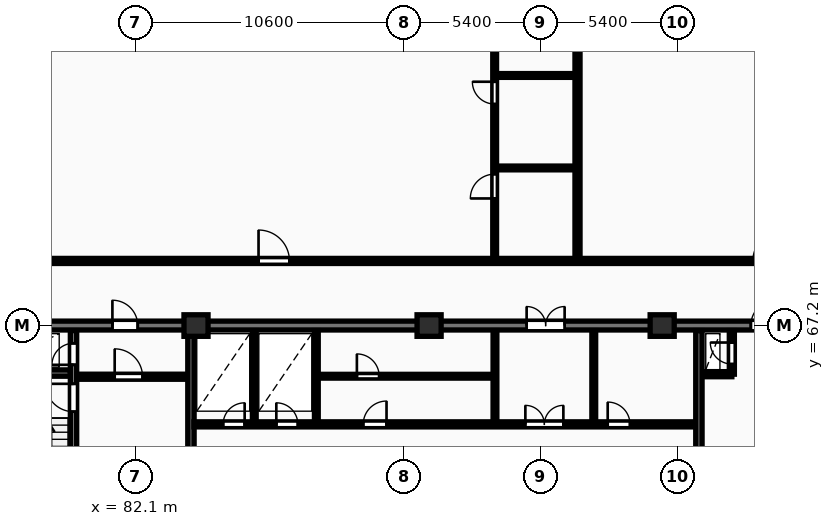
"""IFC4 building model, lengths in metres.
Left out: names, types, materials, properties, quantities, classifications, styles, units other than length and angle.
Written with IfcOpenShell. Run it as: python <this file> out.ifc"""

import sys

from ifc_helpers import new_model, si_unit, direction, frame, frame_2d, origin, origin_2d, place, context, subcontext, project, spatial, rectangle, extrude, element, fill, save


model = new_model("IFC4")
c1 = context("Model", 3, precision=1e-05, world=origin(), true_north=direction((0.0, 1.0)))
c2 = subcontext(c1, "Body", "Model", "MODEL_VIEW")
j1 = project(units=[si_unit("LENGTHUNIT", "METRE"), si_unit("PLANEANGLEUNIT", "RADIAN")], contexts=[c1])
p1 = place(None, origin())
s1 = spatial("IfcSite", under=j1, at=p1, CompositionType="ELEMENT")
p2 = place(p1, origin())
s2 = spatial("IfcBuilding", under=s1, at=p2, CompositionType="ELEMENT")
p3 = place(p2, frame((0.0, 0.0, 93.8)))
s3 = spatial("IfcBuildingStorey", under=s2, at=p3, CompositionType="ELEMENT", Elevation=93.8)
for number, where, z_axis, x_axis in (
    (1, (84.5, 67.2, 0.0), (0.0, 0.0, 1.0), (1.0, 0.0, 0.0)),
    (2, (93.7, 67.2, 0.0), (0.0, 0.0, 1.0), (1.0, 0.0, 0.0)),
    (3, (102.9, 67.2, 0.0), (0.0, 0.0, 1.0), (1.0, 0.0, 0.0)),
):
    element("IfcColumn", number, at=place(p3, frame(where, z_axis=z_axis, x_axis=x_axis)), inside=s3, PredefinedType="COLUMN", context=c2, shape_type="SweptSolid", body=[
        extrude(rectangle(XDim=0.95, YDim=0.85, at=origin_2d()), origin(), (0.0, 0.0, 1.0), 3.25),
    ])
p4 = place(p3, frame((75.95, 67.2, 0.0), z_axis=(0.0, 0.0, 1.0), x_axis=(1.0, 0.0, 0.0)))
e4 = element("IfcWall", 4, at=p4, inside=s3, PredefinedType="SHEAR", context=c2, shape_type="SweptSolid", body=[
    extrude(rectangle(XDim=36.3, YDim=0.35, at=frame_2d((18.15, 0.0))), origin(), (0.0, 0.0, 1.0), 3.25),
])
p5 = place(p4, frame((5.25, 0.0, 0.0)))
e5 = element("IfcOpeningElement", 5, at=p5, cuts=e4, PredefinedType="OPENING", context=c2, shape_type="SweptSolid", body=[
    extrude(rectangle(XDim=1.0, YDim=2.15, at=frame_2d((0.5, 1.075))), frame((0.0, 0.185, 0.0), z_axis=(0.0, -1.0, 0.0), x_axis=(1.0, 0.0, 0.0)), (0.0, 0.0, 1.0), 0.37),
])
p6 = place(p4, frame((21.6, 0.0, 0.0)))
e6 = element("IfcOpeningElement", 6, at=p6, cuts=e4, PredefinedType="OPENING", context=c2, shape_type="SweptSolid", body=[
    extrude(rectangle(XDim=1.5, YDim=2.2, at=frame_2d((0.75, 1.1))), frame((0.0, 0.185, 0.0), z_axis=(0.0, -1.0, 0.0), x_axis=(1.0, 0.0, 0.0)), (0.0, 0.0, 1.0), 0.37),
])
p7 = place(p4, frame((30.45, 0.0, 0.0)))
e7 = element("IfcOpeningElement", 7, at=p7, cuts=e4, PredefinedType="OPENING", context=c2, shape_type="SweptSolid", body=[
    extrude(rectangle(XDim=1.0, YDim=2.15, at=frame_2d((0.5, 1.075))), frame((0.0, 0.185, 0.0), z_axis=(0.0, -1.0, 0.0), x_axis=(1.0, 0.0, 0.0)), (0.0, 0.0, 1.0), 0.37),
])
p8 = place(p3, frame((79.665, 55.4, 0.0), z_axis=(0.0, 0.0, 1.0), x_axis=(0.0, 1.0, 0.0)))
e8 = element("IfcWall", 8, at=p8, inside=s3, PredefinedType="SHEAR", context=c2, shape_type="SweptSolid", body=[
    extrude(rectangle(XDim=11.6, YDim=0.25, at=frame_2d((5.8, 0.0))), origin(), (0.0, 0.0, 1.0), 3.25),
])
p9 = place(p8, frame((0.55, 0.0, 0.0)))
e9 = element("IfcOpeningElement", 9, at=p9, cuts=e8, PredefinedType="OPENING", context=c2, shape_type="SweptSolid", body=[
    extrude(rectangle(XDim=0.85, YDim=2.05, at=frame_2d((0.425, 1.025))), frame((0.0, 0.135, 0.0), z_axis=(0.0, -1.0, 0.0), x_axis=(1.0, 0.0, 0.0)), (0.0, 0.0, 1.0), 0.27),
])
p10 = place(p8, frame((8.4, 0.0, 0.0)))
e10 = element("IfcOpeningElement", 10, at=p10, cuts=e8, PredefinedType="OPENING", context=c2, shape_type="SweptSolid", body=[
    extrude(rectangle(XDim=1.1, YDim=2.1, at=frame_2d((0.55, 1.05))), frame((0.0, 0.135, 0.0), z_axis=(0.0, -1.0, 0.0), x_axis=(1.0, 0.0, 0.0)), (0.0, 0.0, 1.0), 0.27),
])
p11 = place(p8, frame((10.25, 0.0, 0.0)))
e11 = element("IfcOpeningElement", 11, at=p11, cuts=e8, PredefinedType="OPENING", context=c2, shape_type="SweptSolid", body=[
    extrude(rectangle(XDim=0.85, YDim=2.05, at=frame_2d((0.425, 1.025))), frame((0.0, 0.135, 0.0), z_axis=(0.0, -1.0, 0.0), x_axis=(1.0, 0.0, 0.0)), (0.0, 0.0, 1.0), 0.27),
])
p12 = place(p3, frame((76.3, 65.325, 0.0), z_axis=(0.0, 0.0, 1.0), x_axis=(1.0, 0.0, 0.0)))
e12 = element("IfcWall", 12, at=p12, inside=s3, PredefinedType="SHEAR", context=c2, shape_type="SweptSolid", body=[
    extrude(rectangle(XDim=3.24, YDim=0.25, at=frame_2d((1.62, 0.0))), origin(), (0.0, 0.0, 1.0), 3.25),
])
p13 = place(p3, frame((79.79, 65.18, 0.0), z_axis=(0.0, 0.0, 1.0), x_axis=(1.0, 0.0, 0.0)))
e13 = element("IfcWall", 13, at=p13, inside=s3, PredefinedType="PARTITIONING", context=c2, shape_type="SweptSolid", body=[
    extrude(rectangle(XDim=4.39, YDim=0.2, at=frame_2d((2.195, 0.0))), origin(), (0.0, 0.0, 1.0), 2.97),
])
p14 = place(p13, frame((1.5, 0.0, 0.0)))
e14 = element("IfcOpeningElement", 14, at=p14, cuts=e13, PredefinedType="OPENING", context=c2, shape_type="SweptSolid", body=[
    extrude(rectangle(XDim=1.1, YDim=2.1, at=frame_2d((0.55, 1.05))), frame((0.0, 0.11, 0.0), z_axis=(0.0, -1.0, 0.0), x_axis=(1.0, 0.0, 0.0)), (0.0, 0.0, 1.0), 0.22),
])
p15 = place(p3, frame((84.3, 55.4, 0.0), z_axis=(0.0, 0.0, 1.0), x_axis=(0.0, 1.0, 0.0)))
e15 = element("IfcWall", 15, at=p15, inside=s3, PredefinedType="SHEAR", context=c2, shape_type="SweptSolid", body=[
    extrude(rectangle(XDim=11.6, YDim=0.25, at=frame_2d((5.8, 0.0))), origin(), (0.0, 0.0, 1.0), 3.25),
])
p16 = place(p15, frame((5.2, 0.0, 0.0)))
e16 = element("IfcOpeningElement", 16, at=p16, cuts=e15, PredefinedType="OPENING", context=c2, shape_type="SweptSolid", body=[
    extrude(rectangle(XDim=1.1, YDim=2.1, at=frame_2d((0.55, 1.05))), frame((0.0, 0.135, 0.0), z_axis=(0.0, -1.0, 0.0), x_axis=(1.0, 0.0, 0.0)), (0.0, 0.0, 1.0), 0.27),
])
for number, where, z_axis, x_axis in (
    (17, (86.8, 63.4, 0.0), (0.0, 0.0, 1.0), (0.0, 1.0, 0.0)),
    (18, (89.25, 63.4, 0.0), (0.0, 0.0, 1.0), (0.0, 1.0, 0.0)),
):
    element("IfcWall", number, at=place(p3, frame(where, z_axis=z_axis, x_axis=x_axis)), inside=s3, PredefinedType="PARTITIONING", context=c2, shape_type="SweptSolid", body=[
        extrude(rectangle(XDim=3.6, YDim=0.15, at=frame_2d((1.8, 0.0))), origin(), (0.0, 0.0, 1.0), 2.97),
    ])
p17 = place(p3, frame((89.25, 65.2, 0.0), z_axis=(0.0, 0.0, 1.0), x_axis=(1.0, 0.0, 0.0)))
e19 = element("IfcWall", 19, at=p17, inside=s3, PredefinedType="PARTITIONING", context=c2, shape_type="SweptSolid", body=[
    extrude(rectangle(XDim=7.05, YDim=0.15, at=frame_2d((3.525, 0.0))), origin(), (0.0, 0.0, 1.0), 2.97),
])
p18 = place(p17, frame((1.6, 0.0, 0.0)))
e20 = element("IfcOpeningElement", 20, at=p18, cuts=e19, PredefinedType="OPENING", context=c2, shape_type="SweptSolid", body=[
    extrude(rectangle(XDim=0.88, YDim=2.06, at=frame_2d((0.44, 1.03))), frame((0.0, 0.085, 0.0), z_axis=(0.0, -1.0, 0.0), x_axis=(1.0, 0.0, 0.0)), (0.0, 0.0, 1.0), 0.17),
])
for number, where, z_axis, x_axis in (
    (21, (96.3, 63.4, 0.0), (0.0, 0.0, 1.0), (0.0, 1.0, 0.0)),
    (22, (100.2, 63.4, 0.0), (0.0, 0.0, 1.0), (0.0, 1.0, 0.0)),
):
    element("IfcWall", number, at=place(p3, frame(where, z_axis=z_axis, x_axis=x_axis)), inside=s3, PredefinedType="PARTITIONING", context=c2, shape_type="SweptSolid", body=[
        extrude(rectangle(XDim=3.6, YDim=0.15, at=frame_2d((1.8, 0.0))), origin(), (0.0, 0.0, 1.0), 2.97),
    ])
p19 = place(p3, frame((84.42, 63.3, 0.0), z_axis=(0.0, 0.0, 1.0), x_axis=(1.0, 0.0, 0.0)))
e23 = element("IfcWall", 23, at=p19, inside=s3, PredefinedType="PARTITIONING", context=c2, shape_type="SweptSolid", body=[
    extrude(rectangle(XDim=19.83, YDim=0.2, at=frame_2d((9.915, 0.0))), origin(), (0.0, 0.0, 1.0), 2.97),
])
p20 = place(p19, frame((1.15, 0.0, 0.0)))
e24 = element("IfcOpeningElement", 24, at=p20, cuts=e23, PredefinedType="OPENING", context=c2, shape_type="SweptSolid", body=[
    extrude(rectangle(XDim=0.85, YDim=2.05, at=frame_2d((0.425, 1.025))), frame((0.0, 0.11, 0.0), z_axis=(0.0, -1.0, 0.0), x_axis=(1.0, 0.0, 0.0)), (0.0, 0.0, 1.0), 0.22),
])
p21 = place(p19, frame((3.25, 0.0, 0.0)))
e25 = element("IfcOpeningElement", 25, at=p21, cuts=e23, PredefinedType="OPENING", context=c2, shape_type="SweptSolid", body=[
    extrude(rectangle(XDim=0.85, YDim=2.05, at=frame_2d((0.425, 1.025))), frame((0.0, 0.11, 0.0), z_axis=(0.0, -1.0, 0.0), x_axis=(1.0, 0.0, 0.0)), (0.0, 0.0, 1.0), 0.22),
])
p22 = place(p19, frame((13.08, 0.0, 0.0)))
e26 = element("IfcOpeningElement", 26, at=p22, cuts=e23, PredefinedType="OPENING", context=c2, shape_type="SweptSolid", body=[
    extrude(rectangle(XDim=1.5, YDim=2.2, at=frame_2d((0.75, 1.1))), frame((0.0, 0.11, 0.0), z_axis=(0.0, -1.0, 0.0), x_axis=(1.0, 0.0, 0.0)), (0.0, 0.0, 1.0), 0.22),
])
p23 = place(p19, frame((6.68, 0.0, 0.0)))
e27 = element("IfcOpeningElement", 27, at=p23, cuts=e23, PredefinedType="OPENING", context=c2, shape_type="SweptSolid", body=[
    extrude(rectangle(XDim=0.92, YDim=2.08, at=frame_2d((0.46, 1.04))), frame((0.0, 0.11, 0.0), z_axis=(0.0, -1.0, 0.0), x_axis=(1.0, 0.0, 0.0)), (0.0, 0.0, 1.0), 0.22),
])
p24 = place(p19, frame((16.33, 0.0, 0.0)))
e28 = element("IfcOpeningElement", 28, at=p24, cuts=e23, PredefinedType="OPENING", context=c2, shape_type="SweptSolid", body=[
    extrude(rectangle(XDim=0.88, YDim=2.06, at=frame_2d((0.44, 1.03))), frame((0.0, 0.11, 0.0), z_axis=(0.0, -1.0, 0.0), x_axis=(1.0, 0.0, 0.0)), (0.0, 0.0, 1.0), 0.22),
])
p25 = place(p3, frame((104.45, 65.28, 0.0), z_axis=(0.0, 0.0, 1.0), x_axis=(1.0, 0.0, 0.0)))
e29 = element("IfcWall", 29, at=p25, inside=s3, PredefinedType="PARTITIONING", context=c2, shape_type="SweptSolid", body=[
    extrude(rectangle(XDim=1.2, YDim=0.2, at=frame_2d((0.6, 0.0))), origin(), (0.0, 0.0, 1.0), 2.97),
])
p26 = place(p3, frame((105.65, 65.28, 0.0), z_axis=(0.0, 0.0, 1.0), x_axis=(0.0, 1.0, 0.0)))
e30 = element("IfcWall", 30, at=p26, inside=s3, PredefinedType="PARTITIONING", context=c2, shape_type="SweptSolid", body=[
    extrude(rectangle(XDim=1.72, YDim=0.2, at=frame_2d((0.86, 0.0))), origin(), (0.0, 0.0, 1.0), 2.97),
])
p27 = place(p26, frame((0.4, 0.0, 0.0)))
e31 = element("IfcOpeningElement", 31, at=p27, cuts=e30, PredefinedType="OPENING", context=c2, shape_type="SweptSolid", body=[
    extrude(rectangle(XDim=0.85, YDim=2.05, at=frame_2d((0.425, 1.025))), frame((0.0, 0.11, 0.0), z_axis=(0.0, -1.0, 0.0), x_axis=(1.0, 0.0, 0.0)), (0.0, 0.0, 1.0), 0.22),
])
p28 = place(p3, frame((104.35, 58.4, 0.0), z_axis=(0.0, 0.0, 1.0), x_axis=(0.0, 1.0, 0.0)))
e32 = element("IfcWall", 32, at=p28, inside=s3, PredefinedType="SHEAR", context=c2, shape_type="SweptSolid", body=[
    extrude(rectangle(XDim=8.6, YDim=0.25, at=frame_2d((4.3, 0.0))), origin(), (0.0, 0.0, 1.0), 3.25),
])
p29 = place(p28, frame((1.8, 0.0, 0.0)))
e33 = element("IfcOpeningElement", 33, at=p29, cuts=e32, PredefinedType="OPENING", context=c2, shape_type="SweptSolid", body=[
    extrude(rectangle(XDim=1.1, YDim=2.1, at=frame_2d((0.55, 1.05))), frame((0.0, 0.135, 0.0), z_axis=(0.0, -1.0, 0.0), x_axis=(1.0, 0.0, 0.0)), (0.0, 0.0, 1.0), 0.27),
])
p30 = place(p3, frame((99.558, 69.83, 0.0), z_axis=(0.0, 0.0, 1.0), x_axis=(0.0, 1.0, 0.0)))
e34 = element("IfcWall", 34, at=p30, inside=s3, PredefinedType="PARTITIONING", context=c2, shape_type="SweptSolid", body=[
    extrude(rectangle(XDim=26.07, YDim=0.2, at=frame_2d((13.035, 0.0))), origin(), (0.0, 0.0, 1.0), 2.97),
])
p31 = place(p3, frame((96.348, 73.42, 0.0), z_axis=(0.0, 0.0, 1.0), x_axis=(1.0, 0.0, 0.0)))
e35 = element("IfcWall", 35, at=p31, inside=s3, PredefinedType="PARTITIONING", context=c2, shape_type="SweptSolid", body=[
    extrude(rectangle(XDim=3.13, YDim=0.15, at=frame_2d((1.565, 0.0))), origin(), (0.0, 0.0, 1.0), 2.561),
])
p32 = place(p3, frame((96.348, 77.07, 0.0), z_axis=(0.0, 0.0, 1.0), x_axis=(1.0, 0.0, 0.0)))
e36 = element("IfcWall", 36, at=p32, inside=s3, PredefinedType="PARTITIONING", context=c2, shape_type="SweptSolid", body=[
    extrude(rectangle(XDim=3.13, YDim=0.15, at=frame_2d((1.565, 0.0))), origin(), (0.0, 0.0, 1.0), 2.97),
])
p33 = place(p3, frame((96.288, 69.81, 0.0), z_axis=(0.0, 0.0, 1.0), x_axis=(0.0, 1.0, 0.0)))
e37 = element("IfcWall", 37, at=p33, inside=s3, PredefinedType="PARTITIONING", context=c2, shape_type="SweptSolid", body=[
    extrude(rectangle(XDim=20.78, YDim=0.15, at=frame_2d((10.39, 0.0))), origin(), (0.0, 0.0, 1.0), 2.97),
])
p34 = place(p33, frame((2.406, 0.0, 0.0)))
e38 = element("IfcOpeningElement", 38, at=p34, cuts=e37, PredefinedType="OPENING", context=c2, shape_type="SweptSolid", body=[
    extrude(rectangle(XDim=0.96, YDim=2.1, at=frame_2d((0.48, 1.05))), frame((0.0, 0.085, 0.0), z_axis=(0.0, -1.0, 0.0), x_axis=(1.0, 0.0, 0.0)), (0.0, 0.0, 1.0), 0.17),
])
p35 = place(p33, frame((6.133, 0.0, 0.0)))
e39 = element("IfcOpeningElement", 39, at=p35, cuts=e37, PredefinedType="OPENING", context=c2, shape_type="SweptSolid", body=[
    extrude(rectangle(XDim=0.88, YDim=2.06, at=frame_2d((0.44, 1.03))), frame((0.0, 0.085, 0.0), z_axis=(0.0, -1.0, 0.0), x_axis=(1.0, 0.0, 0.0)), (0.0, 0.0, 1.0), 0.17),
])
p36 = place(p33, frame((11.615, 0.0, 0.0)))
e40 = element("IfcOpeningElement", 40, at=p36, cuts=e37, PredefinedType="OPENING", context=c2, shape_type="SweptSolid", body=[
    extrude(rectangle(XDim=0.84, YDim=2.04, at=frame_2d((0.42, 1.02))), frame((0.0, 0.085, 0.0), z_axis=(0.0, -1.0, 0.0), x_axis=(1.0, 0.0, 0.0)), (0.0, 0.0, 1.0), 0.17),
])
p37 = place(p3, frame((57.6, 69.75, 0.0), z_axis=(0.0, 0.0, 1.0), x_axis=(1.0, 0.0, 0.0)))
e41 = element("IfcWall", 41, at=p37, inside=s3, PredefinedType="PARTITIONING", context=c2, shape_type="SweptSolid", body=[
    extrude(rectangle(XDim=73.0, YDim=0.2, at=frame_2d((36.5, 0.0))), origin(), (0.0, 0.0, 1.0), 2.97),
])
p38 = place(p37, frame((7.372, 0.0, 0.0)))
e42 = element("IfcOpeningElement", 42, at=p38, cuts=e41, PredefinedType="OPENING", context=c2, shape_type="SweptSolid", body=[
    extrude(rectangle(XDim=1.22, YDim=2.18, at=frame_2d((0.61, 1.09))), frame((0.0, 0.11, 0.0), z_axis=(0.0, -1.0, 0.0), x_axis=(1.0, 0.0, 0.0)), (0.0, 0.0, 1.0), 0.22),
])
p39 = place(p37, frame((29.368, 0.0, 0.0)))
e43 = element("IfcOpeningElement", 43, at=p39, cuts=e41, PredefinedType="OPENING", context=c2, shape_type="SweptSolid", body=[
    extrude(rectangle(XDim=1.22, YDim=2.18, at=frame_2d((0.61, 1.09))), frame((0.0, 0.11, 0.0), z_axis=(0.0, -1.0, 0.0), x_axis=(1.0, 0.0, 0.0)), (0.0, 0.0, 1.0), 0.22),
])
p40 = place(p37, frame((48.88, 0.0, 0.0)))
e44 = element("IfcOpeningElement", 44, at=p40, cuts=e41, PredefinedType="OPENING", context=c2, shape_type="SweptSolid", body=[
    extrude(rectangle(XDim=1.22, YDim=2.18, at=frame_2d((0.61, 1.09))), frame((0.0, 0.11, 0.0), z_axis=(0.0, -1.0, 0.0), x_axis=(1.0, 0.0, 0.0)), (0.0, 0.0, 1.0), 0.22),
])
p41 = place(p37, frame((60.081, 0.0, 0.0)))
e45 = element("IfcOpeningElement", 45, at=p41, cuts=e41, PredefinedType="OPENING", context=c2, shape_type="SweptSolid", body=[
    extrude(rectangle(XDim=0.95, YDim=2.15, at=frame_2d((0.475, 1.075))), frame((0.0, 0.11, 0.0), z_axis=(0.0, -1.0, 0.0), x_axis=(1.0, 0.0, 0.0)), (0.0, 0.0, 1.0), 0.22),
])
p42 = place(p5, origin())
e46 = element("IfcDoor", 46, at=p42, inside=s3, OperationType="SINGLE_SWING_LEFT", PredefinedType="DOOR", context=c2, shape_type="SweptSolid", body=[
    extrude(rectangle(XDim=1.0, YDim=2.15, at=frame_2d((0.5, 1.075))), frame((0.0, 0.025, 0.0), z_axis=(0.0, -1.0, 0.0), x_axis=(1.0, 0.0, 0.0)), (0.0, 0.0, 1.0), 0.05),
])
fill(e5, e46)
p43 = place(p6, origin())
e47 = element("IfcDoor", 47, at=p43, inside=s3, OperationType="DOUBLE_DOOR_SINGLE_SWING", PredefinedType="DOOR", context=c2, shape_type="SweptSolid", body=[
    extrude(rectangle(XDim=1.5, YDim=2.2, at=frame_2d((0.75, 1.1))), frame((0.0, 0.025, 0.0), z_axis=(0.0, -1.0, 0.0), x_axis=(1.0, 0.0, 0.0)), (0.0, 0.0, 1.0), 0.05),
])
fill(e6, e47)
p44 = place(p7, origin())
e48 = element("IfcDoor", 48, at=p44, inside=s3, OperationType="SINGLE_SWING_RIGHT", PredefinedType="DOOR", context=c2, shape_type="SweptSolid", body=[
    extrude(rectangle(XDim=1.0, YDim=2.15, at=frame_2d((0.5, 1.075))), frame((0.0, 0.025, 0.0), z_axis=(0.0, -1.0, 0.0), x_axis=(1.0, 0.0, 0.0)), (0.0, 0.0, 1.0), 0.05),
])
fill(e7, e48)
p45 = place(p10, origin())
e49 = element("IfcDoor", 49, at=p45, inside=s3, OperationType="SINGLE_SWING_RIGHT", PredefinedType="DOOR", context=c2, shape_type="SweptSolid", body=[
    extrude(rectangle(XDim=1.1, YDim=2.1, at=frame_2d((0.55, 1.05))), frame((0.0, 0.025, 0.0), z_axis=(0.0, -1.0, 0.0), x_axis=(1.0, 0.0, 0.0)), (0.0, 0.0, 1.0), 0.05),
])
fill(e10, e49)
p46 = place(p11, origin())
e50 = element("IfcDoor", 50, at=p46, inside=s3, OperationType="SINGLE_SWING_LEFT", PredefinedType="DOOR", context=c2, shape_type="SweptSolid", body=[
    extrude(rectangle(XDim=0.85, YDim=2.05, at=frame_2d((0.425, 1.025))), frame((0.0, 0.025, 0.0), z_axis=(0.0, -1.0, 0.0), x_axis=(1.0, 0.0, 0.0)), (0.0, 0.0, 1.0), 0.05),
])
fill(e11, e50)
p47 = place(p14, origin())
e51 = element("IfcDoor", 51, at=p47, inside=s3, OperationType="SINGLE_SWING_LEFT", PredefinedType="DOOR", context=c2, shape_type="SweptSolid", body=[
    extrude(rectangle(XDim=1.1, YDim=2.1, at=frame_2d((0.55, 1.05))), frame((0.0, 0.025, 0.0), z_axis=(0.0, -1.0, 0.0), x_axis=(1.0, 0.0, 0.0)), (0.0, 0.0, 1.0), 0.05),
])
fill(e14, e51)
p48 = place(p18, origin())
e52 = element("IfcDoor", 52, at=p48, inside=s3, OperationType="SINGLE_SWING_LEFT", PredefinedType="DOOR", context=c2, shape_type="SweptSolid", body=[
    extrude(rectangle(XDim=0.88, YDim=2.06, at=frame_2d((0.44, 1.03))), frame((0.0, 0.025, 0.0), z_axis=(0.0, -1.0, 0.0), x_axis=(1.0, 0.0, 0.0)), (0.0, 0.0, 1.0), 0.05),
])
fill(e20, e52)
p49 = place(p20, origin())
e53 = element("IfcDoor", 53, at=p49, inside=s3, OperationType="SINGLE_SWING_RIGHT", PredefinedType="DOOR", context=c2, shape_type="SweptSolid", body=[
    extrude(rectangle(XDim=0.85, YDim=2.05, at=frame_2d((0.425, 1.025))), frame((0.0, 0.025, 0.0), z_axis=(0.0, -1.0, 0.0), x_axis=(1.0, 0.0, 0.0)), (0.0, 0.0, 1.0), 0.05),
])
fill(e24, e53)
p50 = place(p21, origin())
e54 = element("IfcDoor", 54, at=p50, inside=s3, OperationType="SINGLE_SWING_LEFT", PredefinedType="DOOR", context=c2, shape_type="SweptSolid", body=[
    extrude(rectangle(XDim=0.85, YDim=2.05, at=frame_2d((0.425, 1.025))), frame((0.0, 0.025, 0.0), z_axis=(0.0, -1.0, 0.0), x_axis=(1.0, 0.0, 0.0)), (0.0, 0.0, 1.0), 0.05),
])
fill(e25, e54)
p51 = place(p22, origin())
e55 = element("IfcDoor", 55, at=p51, inside=s3, OperationType="DOUBLE_DOOR_SINGLE_SWING", PredefinedType="DOOR", context=c2, shape_type="SweptSolid", body=[
    extrude(rectangle(XDim=1.5, YDim=2.2, at=frame_2d((0.75, 1.1))), frame((0.0, 0.025, 0.0), z_axis=(0.0, -1.0, 0.0), x_axis=(1.0, 0.0, 0.0)), (0.0, 0.0, 1.0), 0.05),
])
fill(e26, e55)
p52 = place(p23, origin())
e56 = element("IfcDoor", 56, at=p52, inside=s3, OperationType="SINGLE_SWING_RIGHT", PredefinedType="DOOR", context=c2, shape_type="SweptSolid", body=[
    extrude(rectangle(XDim=0.92, YDim=2.08, at=frame_2d((0.46, 1.04))), frame((0.0, 0.025, 0.0), z_axis=(0.0, -1.0, 0.0), x_axis=(1.0, 0.0, 0.0)), (0.0, 0.0, 1.0), 0.05),
])
fill(e27, e56)
p53 = place(p24, origin())
e57 = element("IfcDoor", 57, at=p53, inside=s3, OperationType="SINGLE_SWING_LEFT", PredefinedType="DOOR", context=c2, shape_type="SweptSolid", body=[
    extrude(rectangle(XDim=0.88, YDim=2.06, at=frame_2d((0.44, 1.03))), frame((0.0, 0.025, 0.0), z_axis=(0.0, -1.0, 0.0), x_axis=(1.0, 0.0, 0.0)), (0.0, 0.0, 1.0), 0.05),
])
fill(e28, e57)
p54 = place(p27, origin())
e58 = element("IfcDoor", 58, at=p54, inside=s3, OperationType="SINGLE_SWING_RIGHT", PredefinedType="DOOR", context=c2, shape_type="SweptSolid", body=[
    extrude(rectangle(XDim=0.85, YDim=2.05, at=frame_2d((0.425, 1.025))), frame((0.0, 0.025, 0.0), z_axis=(0.0, -1.0, 0.0), x_axis=(1.0, 0.0, 0.0)), (0.0, 0.0, 1.0), 0.05),
])
fill(e31, e58)
p55 = place(p34, origin())
e59 = element("IfcDoor", 59, at=p55, inside=s3, OperationType="SINGLE_SWING_LEFT", PredefinedType="DOOR", context=c2, shape_type="SweptSolid", body=[
    extrude(rectangle(XDim=0.96, YDim=2.1, at=frame_2d((0.48, 1.05))), frame((0.0, 0.025, 0.0), z_axis=(0.0, -1.0, 0.0), x_axis=(1.0, 0.0, 0.0)), (0.0, 0.0, 1.0), 0.05),
])
fill(e38, e59)
p56 = place(p35, origin())
e60 = element("IfcDoor", 60, at=p56, inside=s3, OperationType="SINGLE_SWING_RIGHT", PredefinedType="DOOR", context=c2, shape_type="SweptSolid", body=[
    extrude(rectangle(XDim=0.88, YDim=2.06, at=frame_2d((0.44, 1.03))), frame((0.0, 0.025, 0.0), z_axis=(0.0, -1.0, 0.0), x_axis=(1.0, 0.0, 0.0)), (0.0, 0.0, 1.0), 0.05),
])
fill(e39, e60)
p57 = place(p39, origin())
e61 = element("IfcDoor", 61, at=p57, inside=s3, OperationType="SINGLE_SWING_LEFT", PredefinedType="DOOR", context=c2, shape_type="SweptSolid", body=[
    extrude(rectangle(XDim=1.22, YDim=2.18, at=frame_2d((0.61, 1.09))), frame((0.0, 0.025, 0.0), z_axis=(0.0, -1.0, 0.0), x_axis=(1.0, 0.0, 0.0)), (0.0, 0.0, 1.0), 0.05),
])
fill(e43, e61)
p58 = place(p40, origin())
e62 = element("IfcDoor", 62, at=p58, inside=s3, OperationType="SINGLE_SWING_RIGHT", PredefinedType="DOOR", context=c2, shape_type="SweptSolid", body=[
    extrude(rectangle(XDim=1.22, YDim=2.18, at=frame_2d((0.61, 1.09))), frame((0.0, 0.025, 0.0), z_axis=(0.0, -1.0, 0.0), x_axis=(1.0, 0.0, 0.0)), (0.0, 0.0, 1.0), 0.05),
])
fill(e44, e62)
save(model, sys.argv[1])
